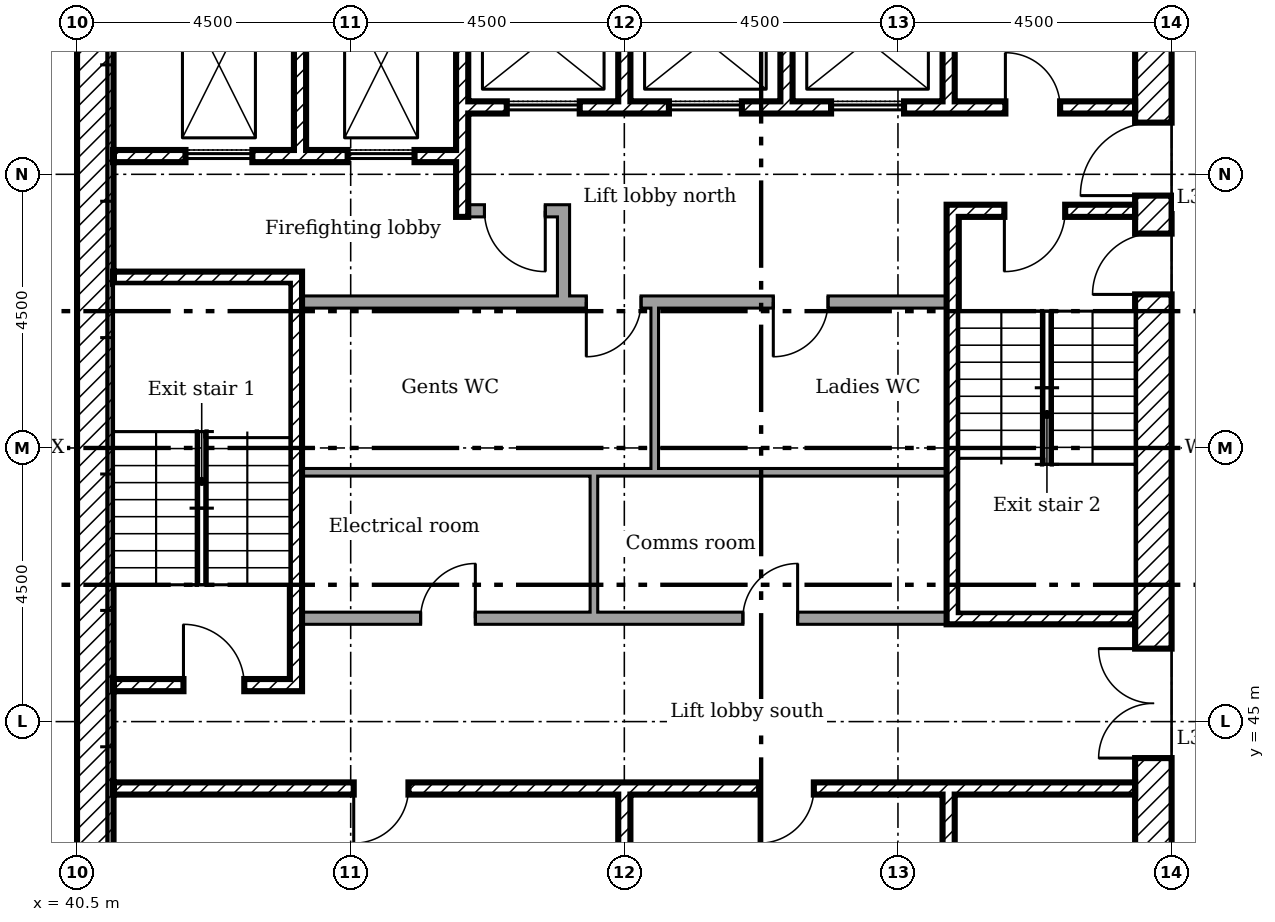
"""IFC4 building model, lengths in metres.
Left out: names, types, materials, properties, quantities, classifications, styles, units other than length and angle.
Written with IfcOpenShell. Run it as: python <this file> out.ifc"""

import sys

from ifc_helpers import new_model, si_unit, direction, frame, frame_2d, origin, place, context, subcontext, project, spatial, rectangle, extrude, element, fill, save


model = new_model("IFC4")
c1 = context("Model", 3, precision=1e-05, world=origin(), true_north=direction((0.0, 1.0)))
c2 = subcontext(c1, "Body", "Model", "MODEL_VIEW")
j1 = project(units=[si_unit("LENGTHUNIT", "METRE"), si_unit("PLANEANGLEUNIT", "RADIAN")], contexts=[c1])
p1 = place(None, origin())
s1 = spatial("IfcSite", under=j1, at=p1, CompositionType="ELEMENT")
p2 = place(p1, origin())
s2 = spatial("IfcBuilding", under=s1, at=p2, CompositionType="ELEMENT")
p3 = place(p2, frame((0.0, 0.0, 154.6)))
s3 = spatial("IfcBuildingStorey", under=s2, at=p3, CompositionType="ELEMENT", Elevation=154.6)
p4 = place(p3, frame((58.2, 40.5, 0.0), z_axis=(0.0, 0.0, 1.0), x_axis=(0.0, 1.0, 0.0)))
e1 = element("IfcWall", 1, at=p4, inside=s3, PredefinedType="SHEAR", context=c2, shape_type="SweptSolid", body=[
    extrude(rectangle(XDim=18.0, YDim=0.6, at=frame_2d((9.0, 0.0))), origin(), (0.0, 0.0, 1.0), 3.35),
])
p5 = place(p4, frame((13.15, 0.0, 0.0)))
e2 = element("IfcOpeningElement", 2, at=p5, cuts=e1, PredefinedType="OPENING", context=c2, shape_type="SweptSolid", body=[
    extrude(rectangle(XDim=1.2, YDim=2.1, at=frame_2d((0.6, 1.05))), frame((0.0, 0.31, 0.0), z_axis=(0.0, -1.0, 0.0), x_axis=(1.0, 0.0, 0.0)), (0.0, 0.0, 1.0), 0.62),
])
p6 = place(p4, frame((3.9, 0.0, 0.0)))
e3 = element("IfcOpeningElement", 3, at=p6, cuts=e1, PredefinedType="OPENING", context=c2, shape_type="SweptSolid", body=[
    extrude(rectangle(XDim=1.8, YDim=2.1, at=frame_2d((0.9, 1.05))), frame((0.0, 0.31, 0.0), z_axis=(0.0, -1.0, 0.0), x_axis=(1.0, 0.0, 0.0)), (0.0, 0.0, 1.0), 0.62),
])
p7 = place(p4, frame((11.525, 0.0, 0.0)))
e4 = element("IfcOpeningElement", 4, at=p7, cuts=e1, PredefinedType="OPENING", context=c2, shape_type="SweptSolid", body=[
    extrude(rectangle(XDim=1.0, YDim=2.1, at=frame_2d((0.5, 1.05))), frame((0.0, 0.31, 0.0), z_axis=(0.0, -1.0, 0.0), x_axis=(1.0, 0.0, 0.0)), (0.0, 0.0, 1.0), 0.62),
])
p8 = place(p3, frame((40.8, 41.1, 0.0), z_axis=(0.0, 0.0, 1.0), x_axis=(0.0, 1.0, 0.0)))
e5 = element("IfcWall", 5, at=p8, inside=s3, PredefinedType="SHEAR", context=c2, shape_type="SweptSolid", body=[
    extrude(rectangle(XDim=16.8, YDim=0.6, at=frame_2d((8.4, 0.0))), origin(), (0.0, 0.0, 1.0), 3.35),
])
p9 = place(p3, frame((44.167, 57.9, 0.0), z_axis=(0.0, 0.0, 1.0), x_axis=(0.0, -1.0, 0.0)))
e6 = element("IfcWall", 6, at=p9, inside=s3, PredefinedType="SHEAR", context=c2, shape_type="SweptSolid", body=[
    extrude(rectangle(XDim=3.5, YDim=0.2, at=frame_2d((1.75, 0.0))), origin(), (0.0, 0.0, 1.0), 3.35),
])
p10 = place(p3, frame((46.833, 57.9, 0.0), z_axis=(0.0, 0.0, 1.0), x_axis=(0.0, -1.0, 0.0)))
e7 = element("IfcWall", 7, at=p10, inside=s3, PredefinedType="SHEAR", context=c2, shape_type="SweptSolid", body=[
    extrude(rectangle(XDim=4.6, YDim=0.2, at=frame_2d((2.3, 0.0))), origin(), (0.0, 0.0, 1.0), 3.35),
])
for number, where, z_axis, x_axis in (
    (8, (49.5, 57.9, 0.0), (0.0, 0.0, 1.0), (0.0, -1.0, 0.0)),
    (9, (52.167, 57.9, 0.0), (0.0, 0.0, 1.0), (0.0, -1.0, 0.0)),
    (10, (54.833, 57.9, 0.0), (0.0, 0.0, 1.0), (0.0, -1.0, 0.0)),
    (11, (49.5, 41.1, 0.0), (0.0, 0.0, 1.0), (0.0, 1.0, 0.0)),
    (12, (54.833, 41.1, 0.0), (0.0, 0.0, 1.0), (0.0, 1.0, 0.0)),
):
    element("IfcWall", number, at=place(p3, frame(where, z_axis=z_axis, x_axis=x_axis)), inside=s3, PredefinedType="SHEAR", context=c2, shape_type="SweptSolid", body=[
        extrude(rectangle(XDim=2.7, YDim=0.2, at=frame_2d((1.35, 0.0))), origin(), (0.0, 0.0, 1.0), 3.35),
    ])
p11 = place(p3, frame((48.5, 51.9, 0.0), z_axis=(0.0, 0.0, 1.0), x_axis=(0.0, 1.0, 0.0)))
e13 = element("IfcWall", 13, at=p11, inside=s3, PredefinedType="PARTITIONING", context=c2, shape_type="SweptSolid", body=[
    extrude(rectangle(XDim=1.6, YDim=0.2, at=frame_2d((0.8, 0.0))), origin(), (0.0, 0.0, 1.0), 3.35),
])
p12 = place(p3, frame((46.933, 53.4, 0.0)))
e14 = element("IfcWall", 14, at=p12, inside=s3, PredefinedType="PARTITIONING", context=c2, shape_type="SweptSolid", body=[
    extrude(rectangle(XDim=1.467, YDim=0.2, at=frame_2d((0.733, 0.0))), origin(), (0.0, 0.0, 1.0), 3.35),
])
p13 = place(p12, frame((0.267, 0.0, 0.0)))
e15 = element("IfcOpeningElement", 15, at=p13, cuts=e14, PredefinedType="OPENING", context=c2, shape_type="SweptSolid", body=[
    extrude(rectangle(XDim=1.0, YDim=2.1, at=frame_2d((0.5, 1.05))), frame((0.0, 0.11, 0.0), z_axis=(0.0, -1.0, 0.0), x_axis=(1.0, 0.0, 0.0)), (0.0, 0.0, 1.0), 0.22),
])
p14 = place(p3, frame((46.933, 55.1, 0.0)))
e16 = element("IfcWall", 16, at=p14, inside=s3, PredefinedType="SHEAR", context=c2, shape_type="SweptSolid", body=[
    extrude(rectangle(XDim=10.967, YDim=0.2, at=frame_2d((5.483, 0.0))), origin(), (0.0, 0.0, 1.0), 3.35),
])
p15 = place(p14, frame((8.833, 0.0, 0.0)))
e17 = element("IfcOpeningElement", 17, at=p15, cuts=e16, PredefinedType="OPENING", context=c2, shape_type="SweptSolid", body=[
    extrude(rectangle(XDim=0.9, YDim=2.1, at=frame_2d((0.45, 1.05))), frame((0.0, 0.11, 0.0), z_axis=(0.0, -1.0, 0.0), x_axis=(1.0, 0.0, 0.0)), (0.0, 0.0, 1.0), 0.22),
])
p16 = place(p14, frame((0.633, 0.0, 0.0)))
e18 = element("IfcOpeningElement", 18, at=p16, cuts=e16, PredefinedType="OPENING", context=c2, shape_type="SweptSolid", body=[
    extrude(rectangle(XDim=1.2, YDim=2.1, at=frame_2d((0.6, 1.05))), frame((0.0, 0.11, 0.0), z_axis=(0.0, -1.0, 0.0), x_axis=(1.0, 0.0, 0.0)), (0.0, 0.0, 1.0), 0.22),
])
p17 = place(p14, frame((3.3, 0.0, 0.0)))
e19 = element("IfcOpeningElement", 19, at=p17, cuts=e16, PredefinedType="OPENING", context=c2, shape_type="SweptSolid", body=[
    extrude(rectangle(XDim=1.2, YDim=2.1, at=frame_2d((0.6, 1.05))), frame((0.0, 0.11, 0.0), z_axis=(0.0, -1.0, 0.0), x_axis=(1.0, 0.0, 0.0)), (0.0, 0.0, 1.0), 0.22),
])
p18 = place(p14, frame((5.967, 0.0, 0.0)))
e20 = element("IfcOpeningElement", 20, at=p18, cuts=e16, PredefinedType="OPENING", context=c2, shape_type="SweptSolid", body=[
    extrude(rectangle(XDim=1.2, YDim=2.1, at=frame_2d((0.6, 1.05))), frame((0.0, 0.11, 0.0), z_axis=(0.0, -1.0, 0.0), x_axis=(1.0, 0.0, 0.0)), (0.0, 0.0, 1.0), 0.22),
])
p19 = place(p3, frame((41.1, 54.3, 0.0)))
e21 = element("IfcWall", 21, at=p19, inside=s3, PredefinedType="SHEAR", context=c2, shape_type="SweptSolid", body=[
    extrude(rectangle(XDim=5.633, YDim=0.2, at=frame_2d((2.817, 0.0))), origin(), (0.0, 0.0, 1.0), 3.35),
])
p20 = place(p19, frame((1.183, 0.0, 0.0)))
e22 = element("IfcOpeningElement", 22, at=p20, cuts=e21, PredefinedType="OPENING", context=c2, shape_type="SweptSolid", body=[
    extrude(rectangle(XDim=1.1, YDim=2.1, at=frame_2d((0.55, 1.05))), frame((0.0, 0.11, 0.0), z_axis=(0.0, -1.0, 0.0), x_axis=(1.0, 0.0, 0.0)), (0.0, 0.0, 1.0), 0.22),
])
p21 = place(p19, frame((3.85, 0.0, 0.0)))
e23 = element("IfcOpeningElement", 23, at=p21, cuts=e21, PredefinedType="OPENING", context=c2, shape_type="SweptSolid", body=[
    extrude(rectangle(XDim=1.1, YDim=2.1, at=frame_2d((0.55, 1.05))), frame((0.0, 0.11, 0.0), z_axis=(0.0, -1.0, 0.0), x_axis=(1.0, 0.0, 0.0)), (0.0, 0.0, 1.0), 0.22),
])
p22 = place(p3, frame((41.1, 43.9, 0.0)))
e24 = element("IfcWall", 24, at=p22, inside=s3, PredefinedType="SHEAR", context=c2, shape_type="SweptSolid", body=[
    extrude(rectangle(XDim=16.8, YDim=0.2, at=frame_2d((8.4, 0.0))), origin(), (0.0, 0.0, 1.0), 3.35),
])
p23 = place(p22, frame((3.95, 0.0, 0.0)))
e25 = element("IfcOpeningElement", 25, at=p23, cuts=e24, PredefinedType="OPENING", context=c2, shape_type="SweptSolid", body=[
    extrude(rectangle(XDim=0.9, YDim=2.1, at=frame_2d((0.45, 1.05))), frame((0.0, 0.11, 0.0), z_axis=(0.0, -1.0, 0.0), x_axis=(1.0, 0.0, 0.0)), (0.0, 0.0, 1.0), 0.22),
])
p24 = place(p22, frame((10.617, 0.0, 0.0)))
e26 = element("IfcOpeningElement", 26, at=p24, cuts=e24, PredefinedType="OPENING", context=c2, shape_type="SweptSolid", body=[
    extrude(rectangle(XDim=0.9, YDim=2.1, at=frame_2d((0.45, 1.05))), frame((0.0, 0.11, 0.0), z_axis=(0.0, -1.0, 0.0), x_axis=(1.0, 0.0, 0.0)), (0.0, 0.0, 1.0), 0.22),
])
p25 = place(p3, frame((44.1, 45.5, 0.0), z_axis=(0.0, 0.0, 1.0), x_axis=(0.0, 1.0, 0.0)))
e27 = element("IfcWall", 27, at=p25, inside=s3, PredefinedType="SHEAR", context=c2, shape_type="SweptSolid", body=[
    extrude(rectangle(XDim=6.9, YDim=0.2, at=frame_2d((3.45, 0.0))), origin(), (0.0, 0.0, 1.0), 3.35),
])
p26 = place(p3, frame((41.1, 52.3, 0.0)))
e28 = element("IfcWall", 28, at=p26, inside=s3, PredefinedType="SHEAR", context=c2, shape_type="SweptSolid", body=[
    extrude(rectangle(XDim=2.9, YDim=0.2, at=frame_2d((1.45, 0.0))), origin(), (0.0, 0.0, 1.0), 3.35),
])
p27 = place(p3, frame((41.1, 45.6, 0.0)))
e29 = element("IfcWall", 29, at=p27, inside=s3, PredefinedType="SHEAR", context=c2, shape_type="SweptSolid", body=[
    extrude(rectangle(XDim=2.9, YDim=0.2, at=frame_2d((1.45, 0.0))), origin(), (0.0, 0.0, 1.0), 3.35),
])
p28 = place(p27, frame((1.15, 0.0, 0.0)))
e30 = element("IfcOpeningElement", 30, at=p28, cuts=e29, PredefinedType="OPENING", context=c2, shape_type="SweptSolid", body=[
    extrude(rectangle(XDim=1.0, YDim=2.1, at=frame_2d((0.5, 1.05))), frame((0.0, 0.11, 0.0), z_axis=(0.0, -1.0, 0.0), x_axis=(1.0, 0.0, 0.0)), (0.0, 0.0, 1.0), 0.22),
])
p29 = place(p3, frame((54.8, 53.4, 0.0)))
e31 = element("IfcWall", 31, at=p29, inside=s3, PredefinedType="SHEAR", context=c2, shape_type="SweptSolid", body=[
    extrude(rectangle(XDim=3.1, YDim=0.2, at=frame_2d((1.55, 0.0))), origin(), (0.0, 0.0, 1.0), 3.35),
])
p30 = place(p29, frame((0.95, 0.0, 0.0)))
e32 = element("IfcOpeningElement", 32, at=p30, cuts=e31, PredefinedType="OPENING", context=c2, shape_type="SweptSolid", body=[
    extrude(rectangle(XDim=1.0, YDim=2.1, at=frame_2d((0.5, 1.05))), frame((0.0, 0.11, 0.0), z_axis=(0.0, -1.0, 0.0), x_axis=(1.0, 0.0, 0.0)), (0.0, 0.0, 1.0), 0.22),
])
p31 = place(p3, frame((54.8, 46.7, 0.0)))
e33 = element("IfcWall", 33, at=p31, inside=s3, PredefinedType="SHEAR", context=c2, shape_type="SweptSolid", body=[
    extrude(rectangle(XDim=3.1, YDim=0.2, at=frame_2d((1.55, 0.0))), origin(), (0.0, 0.0, 1.0), 3.35),
])
p32 = place(p3, frame((54.9, 46.8, 0.0), z_axis=(0.0, 0.0, 1.0), x_axis=(0.0, 1.0, 0.0)))
e34 = element("IfcWall", 34, at=p32, inside=s3, PredefinedType="SHEAR", context=c2, shape_type="SweptSolid", body=[
    extrude(rectangle(XDim=6.5, YDim=0.2, at=frame_2d((3.25, 0.0))), origin(), (0.0, 0.0, 1.0), 3.35),
])
p33 = place(p3, frame((44.2, 51.9, 0.0)))
e35 = element("IfcWall", 35, at=p33, inside=s3, PredefinedType="PARTITIONING", context=c2, shape_type="SweptSolid", body=[
    extrude(rectangle(XDim=10.6, YDim=0.2, at=frame_2d((5.3, 0.0))), origin(), (0.0, 0.0, 1.0), 3.35),
])
p34 = place(p33, frame((4.675, 0.0, 0.0)))
e36 = element("IfcOpeningElement", 36, at=p34, cuts=e35, PredefinedType="OPENING", context=c2, shape_type="SweptSolid", body=[
    extrude(rectangle(XDim=0.9, YDim=2.1, at=frame_2d((0.45, 1.05))), frame((0.0, 0.11, 0.0), z_axis=(0.0, -1.0, 0.0), x_axis=(1.0, 0.0, 0.0)), (0.0, 0.0, 1.0), 0.22),
])
p35 = place(p33, frame((7.75, 0.0, 0.0)))
e37 = element("IfcOpeningElement", 37, at=p35, cuts=e35, PredefinedType="OPENING", context=c2, shape_type="SweptSolid", body=[
    extrude(rectangle(XDim=0.9, YDim=2.1, at=frame_2d((0.45, 1.05))), frame((0.0, 0.11, 0.0), z_axis=(0.0, -1.0, 0.0), x_axis=(1.0, 0.0, 0.0)), (0.0, 0.0, 1.0), 0.22),
])
p36 = place(p3, frame((44.2, 46.7, 0.0)))
e38 = element("IfcWall", 38, at=p36, inside=s3, PredefinedType="PARTITIONING", context=c2, shape_type="SweptSolid", body=[
    extrude(rectangle(XDim=10.6, YDim=0.2, at=frame_2d((5.3, 0.0))), origin(), (0.0, 0.0, 1.0), 3.35),
])
p37 = place(p36, frame((1.95, 0.0, 0.0)))
e39 = element("IfcOpeningElement", 39, at=p37, cuts=e38, PredefinedType="OPENING", context=c2, shape_type="SweptSolid", body=[
    extrude(rectangle(XDim=0.9, YDim=2.1, at=frame_2d((0.45, 1.05))), frame((0.0, 0.11, 0.0), z_axis=(0.0, -1.0, 0.0), x_axis=(1.0, 0.0, 0.0)), (0.0, 0.0, 1.0), 0.22),
])
p38 = place(p36, frame((7.25, 0.0, 0.0)))
e40 = element("IfcOpeningElement", 40, at=p38, cuts=e38, PredefinedType="OPENING", context=c2, shape_type="SweptSolid", body=[
    extrude(rectangle(XDim=0.9, YDim=2.1, at=frame_2d((0.45, 1.05))), frame((0.0, 0.11, 0.0), z_axis=(0.0, -1.0, 0.0), x_axis=(1.0, 0.0, 0.0)), (0.0, 0.0, 1.0), 0.22),
])
p39 = place(p3, frame((49.0, 46.8, 0.0), z_axis=(0.0, 0.0, 1.0), x_axis=(0.0, 1.0, 0.0)))
e41 = element("IfcWall", 41, at=p39, inside=s3, PredefinedType="PARTITIONING", context=c2, shape_type="SweptSolid", body=[
    extrude(rectangle(XDim=2.363, YDim=0.125, at=frame_2d((1.181, 0.0))), origin(), (0.0, 0.0, 1.0), 3.35),
])
p40 = place(p3, frame((48.938, 49.1, 0.0), z_axis=(0.0, 0.0, 1.0), x_axis=(-1.0, 0.0, 0.0)))
e42 = element("IfcWall", 42, at=p40, inside=s3, PredefinedType="PARTITIONING", context=c2, shape_type="SweptSolid", body=[
    extrude(rectangle(XDim=4.738, YDim=0.125, at=frame_2d((2.369, 0.0))), origin(), (0.0, 0.0, 1.0), 3.35),
])
p41 = place(p3, frame((50.062, 49.1, 0.0), z_axis=(0.0, 0.0, 1.0), x_axis=(-1.0, 0.0, 0.0)))
e43 = element("IfcWall", 43, at=p41, inside=s3, PredefinedType="PARTITIONING", context=c2, shape_type="SweptSolid", body=[
    extrude(rectangle(XDim=1.062, YDim=0.125, at=frame_2d((0.531, 0.0))), origin(), (0.0, 0.0, 1.0), 3.35),
])
p42 = place(p3, frame((54.8, 49.1, 0.0), z_axis=(0.0, 0.0, 1.0), x_axis=(-1.0, 0.0, 0.0)))
e44 = element("IfcWall", 44, at=p42, inside=s3, PredefinedType="PARTITIONING", context=c2, shape_type="SweptSolid", body=[
    extrude(rectangle(XDim=4.8, YDim=0.125, at=frame_2d((2.4, 0.0))), origin(), (0.0, 0.0, 1.0), 3.35),
])
p43 = place(p3, frame((50.0, 49.163, 0.0), z_axis=(0.0, 0.0, 1.0), x_axis=(0.0, 1.0, 0.0)))
e45 = element("IfcWall", 45, at=p43, inside=s3, PredefinedType="PARTITIONING", context=c2, shape_type="SweptSolid", body=[
    extrude(rectangle(XDim=2.637, YDim=0.125, at=frame_2d((1.319, 0.0))), origin(), (0.0, 0.0, 1.0), 3.35),
])
p44 = place(p5, origin())
e46 = element("IfcDoor", 46, at=p44, inside=s3, OperationType="SINGLE_SWING_RIGHT", PredefinedType="DOOR", context=c2, shape_type="SweptSolid", body=[
    extrude(rectangle(XDim=1.2, YDim=2.1, at=frame_2d((0.6, 1.05))), frame((0.0, 0.025, 0.0), z_axis=(0.0, -1.0, 0.0), x_axis=(1.0, 0.0, 0.0)), (0.0, 0.0, 1.0), 0.05),
])
fill(e2, e46)
p45 = place(p6, origin())
e47 = element("IfcDoor", 47, at=p45, inside=s3, OperationType="DOUBLE_DOOR_SINGLE_SWING", PredefinedType="DOOR", context=c2, shape_type="SweptSolid", body=[
    extrude(rectangle(XDim=1.8, YDim=2.1, at=frame_2d((0.9, 1.05))), frame((0.0, 0.025, 0.0), z_axis=(0.0, -1.0, 0.0), x_axis=(1.0, 0.0, 0.0)), (0.0, 0.0, 1.0), 0.05),
])
fill(e3, e47)
p46 = place(p28, origin())
e48 = element("IfcDoor", 48, at=p46, inside=s3, OperationType="SINGLE_SWING_RIGHT", PredefinedType="DOOR", context=c2, shape_type="SweptSolid", body=[
    extrude(rectangle(XDim=1.0, YDim=2.1, at=frame_2d((0.5, 1.05))), frame((0.0, 0.025, 0.0), z_axis=(0.0, -1.0, 0.0), x_axis=(1.0, 0.0, 0.0)), (0.0, 0.0, 1.0), 0.05),
])
fill(e30, e48)
p47 = place(p30, frame((1.0, 0.0, 0.0), x_axis=(-1.0, 0.0, 0.0)))
e49 = element("IfcDoor", 49, at=p47, inside=s3, OperationType="SINGLE_SWING_LEFT", PredefinedType="DOOR", context=c2, shape_type="SweptSolid", body=[
    extrude(rectangle(XDim=1.0, YDim=2.1, at=frame_2d((0.5, 1.05))), frame((0.0, 0.025, 0.0), z_axis=(0.0, -1.0, 0.0), x_axis=(1.0, 0.0, 0.0)), (0.0, 0.0, 1.0), 0.05),
])
fill(e32, e49)
p48 = place(p7, origin())
e50 = element("IfcDoor", 50, at=p48, inside=s3, OperationType="SINGLE_SWING_RIGHT", PredefinedType="DOOR", context=c2, shape_type="SweptSolid", body=[
    extrude(rectangle(XDim=1.0, YDim=2.1, at=frame_2d((0.5, 1.05))), frame((0.0, 0.025, 0.0), z_axis=(0.0, -1.0, 0.0), x_axis=(1.0, 0.0, 0.0)), (0.0, 0.0, 1.0), 0.05),
])
fill(e4, e50)
p49 = place(p13, frame((1.0, 0.0, 0.0), x_axis=(-1.0, 0.0, 0.0)))
e51 = element("IfcDoor", 51, at=p49, inside=s3, OperationType="SINGLE_SWING_RIGHT", PredefinedType="DOOR", context=c2, shape_type="SweptSolid", body=[
    extrude(rectangle(XDim=1.0, YDim=2.1, at=frame_2d((0.5, 1.05))), frame((0.0, 0.025, 0.0), z_axis=(0.0, -1.0, 0.0), x_axis=(1.0, 0.0, 0.0)), (0.0, 0.0, 1.0), 0.05),
])
fill(e15, e51)
p50 = place(p15, origin())
e52 = element("IfcDoor", 52, at=p50, inside=s3, OperationType="SINGLE_SWING_RIGHT", PredefinedType="DOOR", context=c2, shape_type="SweptSolid", body=[
    extrude(rectangle(XDim=0.9, YDim=2.1, at=frame_2d((0.45, 1.05))), frame((0.0, 0.025, 0.0), z_axis=(0.0, -1.0, 0.0), x_axis=(1.0, 0.0, 0.0)), (0.0, 0.0, 1.0), 0.05),
])
fill(e17, e52)
p51 = place(p23, frame((0.9, 0.0, 0.0), x_axis=(-1.0, 0.0, 0.0)))
e53 = element("IfcDoor", 53, at=p51, inside=s3, OperationType="SINGLE_SWING_LEFT", PredefinedType="DOOR", context=c2, shape_type="SweptSolid", body=[
    extrude(rectangle(XDim=0.9, YDim=2.1, at=frame_2d((0.45, 1.05))), frame((0.0, 0.025, 0.0), z_axis=(0.0, -1.0, 0.0), x_axis=(1.0, 0.0, 0.0)), (0.0, 0.0, 1.0), 0.05),
])
fill(e25, e53)
p52 = place(p24, frame((0.9, 0.0, 0.0), x_axis=(-1.0, 0.0, 0.0)))
e54 = element("IfcDoor", 54, at=p52, inside=s3, OperationType="SINGLE_SWING_LEFT", PredefinedType="DOOR", context=c2, shape_type="SweptSolid", body=[
    extrude(rectangle(XDim=0.9, YDim=2.1, at=frame_2d((0.45, 1.05))), frame((0.0, 0.025, 0.0), z_axis=(0.0, -1.0, 0.0), x_axis=(1.0, 0.0, 0.0)), (0.0, 0.0, 1.0), 0.05),
])
fill(e26, e54)
p53 = place(p37, origin())
e55 = element("IfcDoor", 55, at=p53, inside=s3, OperationType="SINGLE_SWING_LEFT", PredefinedType="DOOR", context=c2, shape_type="SweptSolid", body=[
    extrude(rectangle(XDim=0.9, YDim=2.1, at=frame_2d((0.45, 1.05))), frame((0.0, 0.025, 0.0), z_axis=(0.0, -1.0, 0.0), x_axis=(1.0, 0.0, 0.0)), (0.0, 0.0, 1.0), 0.05),
])
fill(e39, e55)
p54 = place(p38, origin())
e56 = element("IfcDoor", 56, at=p54, inside=s3, OperationType="SINGLE_SWING_LEFT", PredefinedType="DOOR", context=c2, shape_type="SweptSolid", body=[
    extrude(rectangle(XDim=0.9, YDim=2.1, at=frame_2d((0.45, 1.05))), frame((0.0, 0.025, 0.0), z_axis=(0.0, -1.0, 0.0), x_axis=(1.0, 0.0, 0.0)), (0.0, 0.0, 1.0), 0.05),
])
fill(e40, e56)
p55 = place(p34, frame((0.9, 0.0, 0.0), x_axis=(-1.0, 0.0, 0.0)))
e57 = element("IfcDoor", 57, at=p55, inside=s3, OperationType="SINGLE_SWING_LEFT", PredefinedType="DOOR", context=c2, shape_type="SweptSolid", body=[
    extrude(rectangle(XDim=0.9, YDim=2.1, at=frame_2d((0.45, 1.05))), frame((0.0, 0.025, 0.0), z_axis=(0.0, -1.0, 0.0), x_axis=(1.0, 0.0, 0.0)), (0.0, 0.0, 1.0), 0.05),
])
fill(e36, e57)
p56 = place(p35, frame((0.9, 0.0, 0.0), x_axis=(-1.0, 0.0, 0.0)))
e58 = element("IfcDoor", 58, at=p56, inside=s3, OperationType="SINGLE_SWING_LEFT", PredefinedType="DOOR", context=c2, shape_type="SweptSolid", body=[
    extrude(rectangle(XDim=0.9, YDim=2.1, at=frame_2d((0.45, 1.05))), frame((0.0, 0.025, 0.0), z_axis=(0.0, -1.0, 0.0), x_axis=(1.0, 0.0, 0.0)), (0.0, 0.0, 1.0), 0.05),
])
fill(e37, e58)
p57 = place(p20, origin())
e59 = element("IfcDoor", 59, at=p57, inside=s3, OperationType="SLIDING_TO_LEFT", PredefinedType="DOOR", context=c2, shape_type="SweptSolid", body=[
    extrude(rectangle(XDim=1.1, YDim=2.1, at=frame_2d((0.55, 1.05))), frame((0.0, 0.025, 0.0), z_axis=(0.0, -1.0, 0.0), x_axis=(1.0, 0.0, 0.0)), (0.0, 0.0, 1.0), 0.05),
])
fill(e22, e59)
p58 = place(p21, origin())
e60 = element("IfcDoor", 60, at=p58, inside=s3, OperationType="SLIDING_TO_LEFT", PredefinedType="DOOR", context=c2, shape_type="SweptSolid", body=[
    extrude(rectangle(XDim=1.1, YDim=2.1, at=frame_2d((0.55, 1.05))), frame((0.0, 0.025, 0.0), z_axis=(0.0, -1.0, 0.0), x_axis=(1.0, 0.0, 0.0)), (0.0, 0.0, 1.0), 0.05),
])
fill(e23, e60)
p59 = place(p16, origin())
e61 = element("IfcDoor", 61, at=p59, inside=s3, OperationType="SLIDING_TO_LEFT", PredefinedType="DOOR", context=c2, shape_type="SweptSolid", body=[
    extrude(rectangle(XDim=1.2, YDim=2.1, at=frame_2d((0.6, 1.05))), frame((0.0, 0.025, 0.0), z_axis=(0.0, -1.0, 0.0), x_axis=(1.0, 0.0, 0.0)), (0.0, 0.0, 1.0), 0.05),
])
fill(e18, e61)
p60 = place(p17, origin())
e62 = element("IfcDoor", 62, at=p60, inside=s3, OperationType="SLIDING_TO_LEFT", PredefinedType="DOOR", context=c2, shape_type="SweptSolid", body=[
    extrude(rectangle(XDim=1.2, YDim=2.1, at=frame_2d((0.6, 1.05))), frame((0.0, 0.025, 0.0), z_axis=(0.0, -1.0, 0.0), x_axis=(1.0, 0.0, 0.0)), (0.0, 0.0, 1.0), 0.05),
])
fill(e19, e62)
p61 = place(p18, origin())
e63 = element("IfcDoor", 63, at=p61, inside=s3, OperationType="SLIDING_TO_LEFT", PredefinedType="DOOR", context=c2, shape_type="SweptSolid", body=[
    extrude(rectangle(XDim=1.2, YDim=2.1, at=frame_2d((0.6, 1.05))), frame((0.0, 0.025, 0.0), z_axis=(0.0, -1.0, 0.0), x_axis=(1.0, 0.0, 0.0)), (0.0, 0.0, 1.0), 0.05),
])
fill(e20, e63)
save(model, sys.argv[1])
